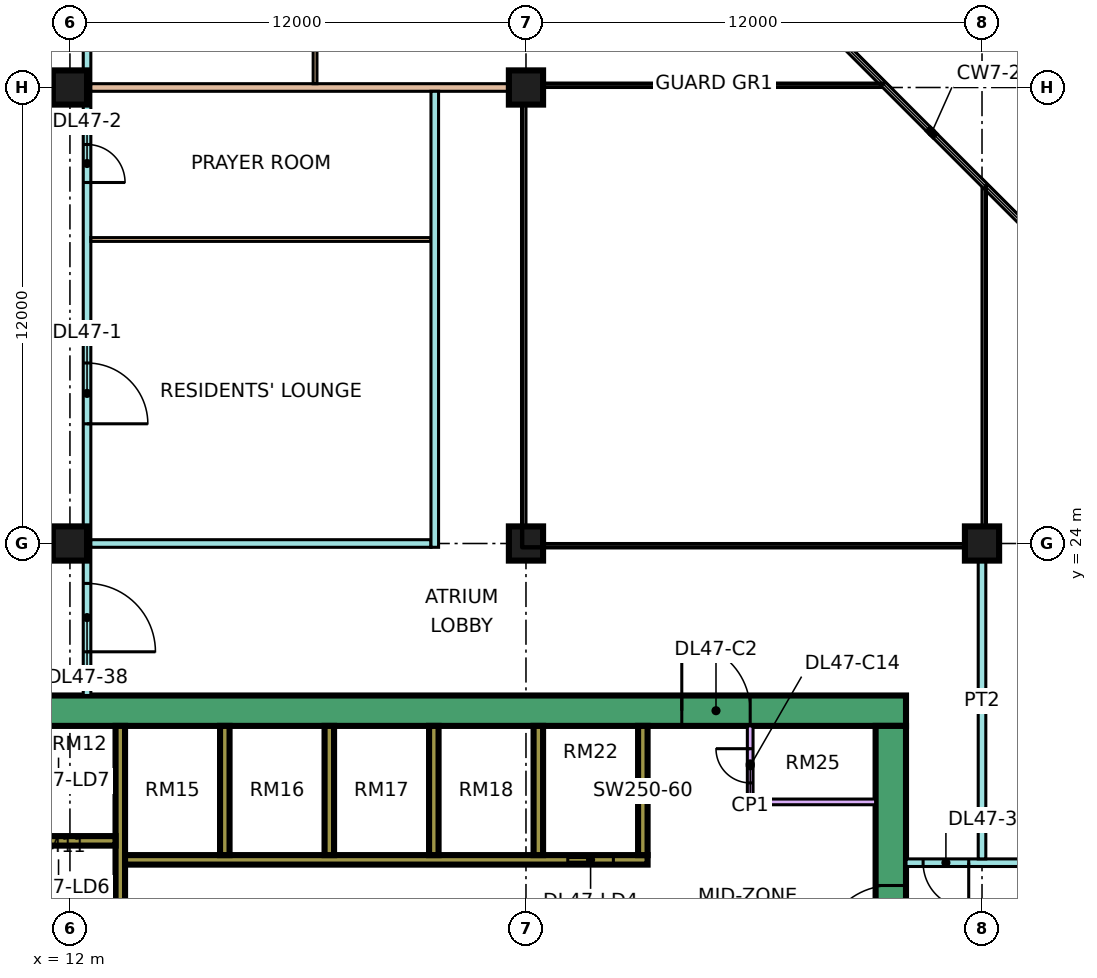
"""IFC4 building model, lengths in metres.
Left out: names, types, materials, properties, quantities, classifications, styles, units other than length and angle.
Written with IfcOpenShell. Run it as: python <this file> out.ifc"""

import sys

from ifc_helpers import new_model, si_unit, direction, frame, frame_2d, origin, origin_2d, place, context, subcontext, project, spatial, rectangle, extrude, element, fill, save


model = new_model("IFC4")
c1 = context("Model", 3, precision=1e-05, world=origin(), true_north=direction((0.0, 1.0)))
c2 = subcontext(c1, "Body", "Model", "MODEL_VIEW")
j1 = project(units=[si_unit("LENGTHUNIT", "METRE"), si_unit("PLANEANGLEUNIT", "RADIAN")], contexts=[c1])
p1 = place(None, origin())
s1 = spatial("IfcSite", under=j1, at=p1, CompositionType="ELEMENT")
p2 = place(p1, origin())
s2 = spatial("IfcBuilding", under=s1, at=p2, CompositionType="ELEMENT")
p3 = place(p2, frame((0.0, 0.0, 202.4)))
s3 = spatial("IfcBuildingStorey", under=s2, at=p3, CompositionType="ELEMENT", Elevation=202.4)
for number, where, z_axis, x_axis in (
    (1, (12.0, 24.0, 0.0), (0.0, 0.0, 1.0), (1.0, 0.0, 0.0)),
    (2, (12.0, 36.0, 0.0), (0.0, 0.0, 1.0), (1.0, 0.0, 0.0)),
    (3, (24.0, 24.0, 0.0), (0.0, 0.0, 1.0), (1.0, 0.0, 0.0)),
    (4, (24.0, 36.0, 0.0), (0.0, 0.0, 1.0), (1.0, 0.0, 0.0)),
    (5, (36.0, 24.0, 0.0), (0.0, 0.0, 1.0), (1.0, 0.0, 0.0)),
):
    element("IfcColumn", number, at=place(p3, frame(where, z_axis=z_axis, x_axis=x_axis)), inside=s3, PredefinedType="COLUMN", context=c2, shape_type="SweptSolid", body=[
        extrude(rectangle(XDim=0.9, YDim=0.9, at=origin_2d()), origin(), (0.0, 0.0, 1.0), 3.75),
    ])
p4 = place(p3, frame((9.0, 19.6, 0.0), z_axis=(0.0, 0.0, 1.0), x_axis=(1.0, 0.0, 0.0)))
e6 = element("IfcWall", 6, at=p4, inside=s3, PredefinedType="SHEAR", context=c2, shape_type="SweptSolid", body=[
    extrude(rectangle(XDim=25.0, YDim=0.8, at=frame_2d((12.5, 0.0))), origin(), (0.0, 0.0, 1.0), 3.75),
])
p5 = place(p4, frame((19.1, 0.0, 0.0)))
e7 = element("IfcOpeningElement", 7, at=p5, cuts=e6, PredefinedType="OPENING", context=c2, shape_type="SweptSolid", body=[
    extrude(rectangle(XDim=1.8, YDim=2.4, at=frame_2d((0.9, 1.2))), frame((0.0, 0.41, 0.0), z_axis=(0.0, -1.0, 0.0), x_axis=(1.0, 0.0, 0.0)), (0.0, 0.0, 1.0), 0.82),
])
p6 = place(p3, frame((33.6, 7.8, 0.0), z_axis=(0.0, 0.0, 1.0), x_axis=(0.0, 1.0, 0.0)))
e8 = element("IfcWall", 8, at=p6, inside=s3, PredefinedType="SHEAR", context=c2, shape_type="SweptSolid", body=[
    extrude(rectangle(XDim=11.4, YDim=0.8, at=frame_2d((5.7, 0.0))), origin(), (0.0, 0.0, 1.0), 3.75),
])
p7 = place(p6, frame((5.4, 0.0, 0.0)))
e9 = element("IfcOpeningElement", 9, at=p7, cuts=e8, PredefinedType="OPENING", context=c2, shape_type="SweptSolid", body=[
    extrude(rectangle(XDim=1.8, YDim=2.4, at=frame_2d((0.9, 1.2))), frame((0.0, 0.41, 0.0), z_axis=(0.0, -1.0, 0.0), x_axis=(1.0, 0.0, 0.0)), (0.0, 0.0, 1.0), 0.82),
])
p8 = place(p3, frame((13.325, 7.8, 0.0), z_axis=(0.0, 0.0, 1.0), x_axis=(0.0, 1.0, 0.0)))
e10 = element("IfcWall", 10, at=p8, inside=s3, PredefinedType="SHEAR", context=c2, shape_type="SweptSolid", body=[
    extrude(rectangle(XDim=11.4, YDim=0.25, at=frame_2d((5.7, 0.0))), origin(), (0.0, 0.0, 1.0), 3.75),
])
p9 = place(p3, frame((13.45, 15.675, 0.0), z_axis=(0.0, 0.0, 1.0), x_axis=(1.0, 0.0, 0.0)))
e11 = element("IfcWall", 11, at=p9, inside=s3, PredefinedType="SHEAR", context=c2, shape_type="SweptSolid", body=[
    extrude(rectangle(XDim=13.75, YDim=0.25, at=frame_2d((6.875, 0.0))), origin(), (0.0, 0.0, 1.0), 3.75),
])
p10 = place(p9, frame((11.65, 0.0, 0.0)))
e12 = element("IfcOpeningElement", 12, at=p10, cuts=e11, PredefinedType="OPENING", context=c2, shape_type="SweptSolid", body=[
    extrude(rectangle(XDim=1.2, YDim=2.2, at=frame_2d((0.6, 1.1))), frame((0.0, 0.135, 0.0), z_axis=(0.0, -1.0, 0.0), x_axis=(1.0, 0.0, 0.0)), (0.0, 0.0, 1.0), 0.27),
])
p11 = place(p3, frame((10.2, 16.175, 0.0), z_axis=(0.0, 0.0, 1.0), x_axis=(1.0, 0.0, 0.0)))
e13 = element("IfcWall", 13, at=p11, inside=s3, PredefinedType="SHEAR", context=c2, shape_type="SweptSolid", body=[
    extrude(rectangle(XDim=3.0, YDim=0.25, at=frame_2d((1.5, 0.0))), origin(), (0.0, 0.0, 1.0), 3.75),
])
for number, where, z_axis, x_axis in (
    (14, (16.075, 15.8, 0.0), (0.0, 0.0, 1.0), (0.0, 1.0, 0.0)),
    (15, (18.825, 15.8, 0.0), (0.0, 0.0, 1.0), (0.0, 1.0, 0.0)),
    (16, (21.575, 15.8, 0.0), (0.0, 0.0, 1.0), (0.0, 1.0, 0.0)),
    (17, (24.325, 15.8, 0.0), (0.0, 0.0, 1.0), (0.0, 1.0, 0.0)),
    (18, (27.075, 15.8, 0.0), (0.0, 0.0, 1.0), (0.0, 1.0, 0.0)),
):
    element("IfcWall", number, at=place(p3, frame(where, z_axis=z_axis, x_axis=x_axis)), inside=s3, PredefinedType="SHEAR", context=c2, shape_type="SweptSolid", body=[
        extrude(rectangle(XDim=3.4, YDim=0.25, at=frame_2d((1.7, 0.0))), origin(), (0.0, 0.0, 1.0), 3.75),
    ])
p12 = place(p3, frame((29.9, 17.2, 0.0), z_axis=(0.0, 0.0, 1.0), x_axis=(0.0, 1.0, 0.0)))
e19 = element("IfcWall", 19, at=p12, inside=s3, PredefinedType="PARTITIONING", context=c2, shape_type="SweptSolid", body=[
    extrude(rectangle(XDim=2.0, YDim=0.15, at=frame_2d((1.0, 0.0))), origin(), (0.0, 0.0, 1.0), 3.3),
])
p13 = place(p12, frame((0.5, 0.0, 0.0)))
e20 = element("IfcOpeningElement", 20, at=p13, cuts=e19, PredefinedType="OPENING", context=c2, shape_type="SweptSolid", body=[
    extrude(rectangle(XDim=0.9, YDim=2.1, at=frame_2d((0.45, 1.05))), frame((0.0, 0.085, 0.0), z_axis=(0.0, -1.0, 0.0), x_axis=(1.0, 0.0, 0.0)), (0.0, 0.0, 1.0), 0.17),
])
p14 = place(p3, frame((29.9, 17.2, 0.0), z_axis=(0.0, 0.0, 1.0), x_axis=(1.0, 0.0, 0.0)))
e21 = element("IfcWall", 21, at=p14, inside=s3, PredefinedType="PARTITIONING", context=c2, shape_type="SweptSolid", body=[
    extrude(rectangle(XDim=3.3, YDim=0.15, at=frame_2d((1.65, 0.0))), origin(), (0.0, 0.0, 1.0), 3.3),
])
p15 = place(p3, frame((12.45, 20.0, 0.0), z_axis=(0.0, 0.0, 1.0), x_axis=(0.0, 1.0, 0.0)))
e22 = element("IfcWall", 22, at=p15, inside=s3, PredefinedType="PARTITIONING", context=c2, shape_type="SweptSolid", body=[
    extrude(rectangle(XDim=42.926, YDim=0.2, at=frame_2d((21.463, 0.0))), origin(), (0.0, 0.0, 1.0), 3.3),
])
p16 = place(p15, frame((7.15, 0.0, 0.0)))
e23 = element("IfcOpeningElement", 23, at=p16, cuts=e22, PredefinedType="OPENING", context=c2, shape_type="SweptSolid", body=[
    extrude(rectangle(XDim=1.6, YDim=2.1, at=frame_2d((0.8, 1.05))), frame((0.0, 0.11, 0.0), z_axis=(0.0, -1.0, 0.0), x_axis=(1.0, 0.0, 0.0)), (0.0, 0.0, 1.0), 0.22),
])
p17 = place(p15, frame((13.5, 0.0, 0.0)))
e24 = element("IfcOpeningElement", 24, at=p17, cuts=e22, PredefinedType="OPENING", context=c2, shape_type="SweptSolid", body=[
    extrude(rectangle(XDim=1.0, YDim=2.1, at=frame_2d((0.5, 1.05))), frame((0.0, 0.11, 0.0), z_axis=(0.0, -1.0, 0.0), x_axis=(1.0, 0.0, 0.0)), (0.0, 0.0, 1.0), 0.22),
])
p18 = place(p15, frame((17.2, 0.0, 0.0)))
e25 = element("IfcOpeningElement", 25, at=p18, cuts=e22, PredefinedType="OPENING", context=c2, shape_type="SweptSolid", body=[
    extrude(rectangle(XDim=1.0, YDim=2.1, at=frame_2d((0.5, 1.05))), frame((0.0, 0.11, 0.0), z_axis=(0.0, -1.0, 0.0), x_axis=(1.0, 0.0, 0.0)), (0.0, 0.0, 1.0), 0.22),
])
p19 = place(p15, frame((35.2, 0.0, 0.0)))
e26 = element("IfcOpeningElement", 26, at=p19, cuts=e22, PredefinedType="OPENING", context=c2, shape_type="SweptSolid", body=[
    extrude(rectangle(XDim=1.0, YDim=2.1, at=frame_2d((0.5, 1.05))), frame((0.0, 0.11, 0.0), z_axis=(0.0, -1.0, 0.0), x_axis=(1.0, 0.0, 0.0)), (0.0, 0.0, 1.0), 0.22),
])
p20 = place(p15, frame((1.15, 0.0, 0.0)))
e27 = element("IfcOpeningElement", 27, at=p20, cuts=e22, PredefinedType="OPENING", context=c2, shape_type="SweptSolid", body=[
    extrude(rectangle(XDim=1.8, YDim=2.1, at=frame_2d((0.9, 1.05))), frame((0.0, 0.11, 0.0), z_axis=(0.0, -1.0, 0.0), x_axis=(1.0, 0.0, 0.0)), (0.0, 0.0, 1.0), 0.22),
])
p21 = place(p15, frame((28.6, 0.0, 0.0)))
e28 = element("IfcOpeningElement", 28, at=p21, cuts=e22, PredefinedType="OPENING", context=c2, shape_type="SweptSolid", body=[
    extrude(rectangle(XDim=1.8, YDim=2.1, at=frame_2d((0.9, 1.05))), frame((0.0, 0.11, 0.0), z_axis=(0.0, -1.0, 0.0), x_axis=(1.0, 0.0, 0.0)), (0.0, 0.0, 1.0), 0.22),
])
p22 = place(p3, frame((12.55, 24.0, 0.0), z_axis=(0.0, 0.0, 1.0), x_axis=(1.0, 0.0, 0.0)))
e29 = element("IfcWall", 29, at=p22, inside=s3, PredefinedType="PARTITIONING", context=c2, shape_type="SweptSolid", body=[
    extrude(rectangle(XDim=8.95, YDim=0.2, at=frame_2d((4.475, 0.0))), origin(), (0.0, 0.0, 1.0), 3.3),
])
p23 = place(p3, frame((12.55, 32.0, 0.0), z_axis=(0.0, 0.0, 1.0), x_axis=(1.0, 0.0, 0.0)))
e30 = element("IfcWall", 30, at=p23, inside=s3, PredefinedType="PARTITIONING", context=c2, shape_type="SweptSolid", body=[
    extrude(rectangle(XDim=8.95, YDim=0.1, at=frame_2d((4.475, 0.0))), origin(), (0.0, 0.0, 1.0), 3.3),
])
p24 = place(p3, frame((12.55, 36.0, 0.0), z_axis=(0.0, 0.0, 1.0), x_axis=(1.0, 0.0, 0.0)))
e31 = element("IfcWall", 31, at=p24, inside=s3, PredefinedType="PARTITIONING", context=c2, shape_type="SweptSolid", body=[
    extrude(rectangle(XDim=11.45, YDim=0.2, at=frame_2d((5.725, 0.0))), origin(), (0.0, 0.0, 1.0), 3.3),
])
p25 = place(p3, frame((18.45, 36.1, 0.0), z_axis=(0.0, 0.0, 1.0), x_axis=(0.0, 1.0, 0.0)))
e32 = element("IfcWall", 32, at=p25, inside=s3, PredefinedType="PARTITIONING", context=c2, shape_type="SweptSolid", body=[
    extrude(rectangle(XDim=5.95, YDim=0.1, at=frame_2d((2.975, 0.0))), origin(), (0.0, 0.0, 1.0), 3.3),
])
p26 = place(p25, frame((0.95, 0.0, 0.0)))
e33 = element("IfcOpeningElement", 33, at=p26, cuts=e32, PredefinedType="OPENING", context=c2, shape_type="SweptSolid", body=[
    extrude(rectangle(XDim=0.9, YDim=2.1, at=frame_2d((0.45, 1.05))), frame((0.0, 0.06, 0.0), z_axis=(0.0, -1.0, 0.0), x_axis=(1.0, 0.0, 0.0)), (0.0, 0.0, 1.0), 0.12),
])
p27 = place(p25, frame((3.95, 0.0, 0.0)))
e34 = element("IfcOpeningElement", 34, at=p27, cuts=e32, PredefinedType="OPENING", context=c2, shape_type="SweptSolid", body=[
    extrude(rectangle(XDim=0.9, YDim=2.1, at=frame_2d((0.45, 1.05))), frame((0.0, 0.06, 0.0), z_axis=(0.0, -1.0, 0.0), x_axis=(1.0, 0.0, 0.0)), (0.0, 0.0, 1.0), 0.12),
])
p28 = place(p3, frame((21.6, 23.9, 0.0), z_axis=(0.0, 0.0, 1.0), x_axis=(0.0, 1.0, 0.0)))
e35 = element("IfcWall", 35, at=p28, inside=s3, PredefinedType="PARTITIONING", context=c2, shape_type="SweptSolid", body=[
    extrude(rectangle(XDim=12.0, YDim=0.2, at=frame_2d((6.0, 0.0))), origin(), (0.0, 0.0, 1.0), 3.3),
])
p29 = place(p3, frame((34.0, 15.6, 0.0), z_axis=(0.0, 0.0, 1.0), x_axis=(1.0, 0.0, 0.0)))
e36 = element("IfcWall", 36, at=p29, inside=s3, PredefinedType="PARTITIONING", context=c2, shape_type="SweptSolid", body=[
    extrude(rectangle(XDim=10.35, YDim=0.2, at=frame_2d((5.175, 0.0))), origin(), (0.0, 0.0, 1.0), 3.3),
])
p30 = place(p29, frame((5.6, 0.0, 0.0)))
e37 = element("IfcOpeningElement", 37, at=p30, cuts=e36, PredefinedType="OPENING", context=c2, shape_type="SweptSolid", body=[
    extrude(rectangle(XDim=1.0, YDim=2.1, at=frame_2d((0.5, 1.05))), frame((0.0, 0.11, 0.0), z_axis=(0.0, -1.0, 0.0), x_axis=(1.0, 0.0, 0.0)), (0.0, 0.0, 1.0), 0.22),
])
p31 = place(p29, frame((0.45, 0.0, 0.0)))
e38 = element("IfcOpeningElement", 38, at=p31, cuts=e36, PredefinedType="OPENING", context=c2, shape_type="SweptSolid", body=[
    extrude(rectangle(XDim=1.2, YDim=2.1, at=frame_2d((0.6, 1.05))), frame((0.0, 0.11, 0.0), z_axis=(0.0, -1.0, 0.0), x_axis=(1.0, 0.0, 0.0)), (0.0, 0.0, 1.0), 0.22),
])
p32 = place(p3, frame((36.0, 15.7, 0.0), z_axis=(0.0, 0.0, 1.0), x_axis=(0.0, 1.0, 0.0)))
e39 = element("IfcWall", 39, at=p32, inside=s3, PredefinedType="PARTITIONING", context=c2, shape_type="SweptSolid", body=[
    extrude(rectangle(XDim=8.3, YDim=0.2, at=frame_2d((4.15, 0.0))), origin(), (0.0, 0.0, 1.0), 3.3),
])
p33 = place(p10, origin())
e40 = element("IfcDoor", 40, at=p33, inside=s3, OperationType="DOUBLE_DOOR_SLIDING", PredefinedType="DOOR", context=c2, shape_type="SweptSolid", body=[
    extrude(rectangle(XDim=1.2, YDim=2.2, at=frame_2d((0.6, 1.1))), frame((0.0, 0.025, 0.0), z_axis=(0.0, -1.0, 0.0), x_axis=(1.0, 0.0, 0.0)), (0.0, 0.0, 1.0), 0.05),
])
fill(e12, e40)
p34 = place(p7, origin())
e41 = element("IfcDoor", 41, at=p34, inside=s3, OperationType="DOUBLE_DOOR_SINGLE_SWING", PredefinedType="DOOR", context=c2, shape_type="SweptSolid", body=[
    extrude(rectangle(XDim=1.8, YDim=2.4, at=frame_2d((0.9, 1.2))), frame((0.0, 0.025, 0.0), z_axis=(0.0, -1.0, 0.0), x_axis=(1.0, 0.0, 0.0)), (0.0, 0.0, 1.0), 0.05),
])
fill(e9, e41)
p35 = place(p5, origin())
e42 = element("IfcDoor", 42, at=p35, inside=s3, OperationType="DOUBLE_DOOR_SINGLE_SWING", PredefinedType="DOOR", context=c2, shape_type="SweptSolid", body=[
    extrude(rectangle(XDim=1.8, YDim=2.4, at=frame_2d((0.9, 1.2))), frame((0.0, 0.025, 0.0), z_axis=(0.0, -1.0, 0.0), x_axis=(1.0, 0.0, 0.0)), (0.0, 0.0, 1.0), 0.05),
])
fill(e7, e42)
p36 = place(p13, frame((0.9, 0.0, 0.0), z_axis=(0.0, 0.0, 1.0), x_axis=(-1.0, 0.0, 0.0)))
e43 = element("IfcDoor", 43, at=p36, inside=s3, OperationType="SINGLE_SWING_RIGHT", PredefinedType="DOOR", context=c2, shape_type="SweptSolid", body=[
    extrude(rectangle(XDim=0.9, YDim=2.1, at=frame_2d((0.45, 1.05))), frame((0.0, 0.025, 0.0), z_axis=(0.0, -1.0, 0.0), x_axis=(1.0, 0.0, 0.0)), (0.0, 0.0, 1.0), 0.05),
])
fill(e20, e43)
p37 = place(p16, frame((1.6, 0.0, 0.0), z_axis=(0.0, 0.0, 1.0), x_axis=(-1.0, 0.0, 0.0)))
e44 = element("IfcDoor", 44, at=p37, inside=s3, OperationType="DOUBLE_DOOR_SINGLE_SWING", PredefinedType="DOOR", context=c2, shape_type="SweptSolid", body=[
    extrude(rectangle(XDim=1.6, YDim=2.1, at=frame_2d((0.8, 1.05))), frame((0.0, 0.025, 0.0), z_axis=(0.0, -1.0, 0.0), x_axis=(1.0, 0.0, 0.0)), (0.0, 0.0, 1.0), 0.05),
])
fill(e23, e44)
p38 = place(p17, frame((1.0, 0.0, 0.0), z_axis=(0.0, 0.0, 1.0), x_axis=(-1.0, 0.0, 0.0)))
e45 = element("IfcDoor", 45, at=p38, inside=s3, OperationType="SINGLE_SWING_LEFT", PredefinedType="DOOR", context=c2, shape_type="SweptSolid", body=[
    extrude(rectangle(XDim=1.0, YDim=2.1, at=frame_2d((0.5, 1.05))), frame((0.0, 0.025, 0.0), z_axis=(0.0, -1.0, 0.0), x_axis=(1.0, 0.0, 0.0)), (0.0, 0.0, 1.0), 0.05),
])
fill(e24, e45)
p39 = place(p31, origin())
e46 = element("IfcDoor", 46, at=p39, inside=s3, OperationType="SINGLE_SWING_RIGHT", PredefinedType="DOOR", context=c2, shape_type="SweptSolid", body=[
    extrude(rectangle(XDim=1.2, YDim=2.1, at=frame_2d((0.6, 1.05))), frame((0.0, 0.025, 0.0), z_axis=(0.0, -1.0, 0.0), x_axis=(1.0, 0.0, 0.0)), (0.0, 0.0, 1.0), 0.05),
])
fill(e38, e46)
p40 = place(p20, frame((1.8, 0.0, 0.0), z_axis=(0.0, 0.0, 1.0), x_axis=(-1.0, 0.0, 0.0)))
e47 = element("IfcDoor", 47, at=p40, inside=s3, OperationType="DOUBLE_DOOR_SINGLE_SWING", PredefinedType="DOOR", context=c2, shape_type="SweptSolid", body=[
    extrude(rectangle(XDim=1.8, YDim=2.1, at=frame_2d((0.9, 1.05))), frame((0.0, 0.025, 0.0), z_axis=(0.0, -1.0, 0.0), x_axis=(1.0, 0.0, 0.0)), (0.0, 0.0, 1.0), 0.05),
])
fill(e27, e47)
save(model, sys.argv[1])
